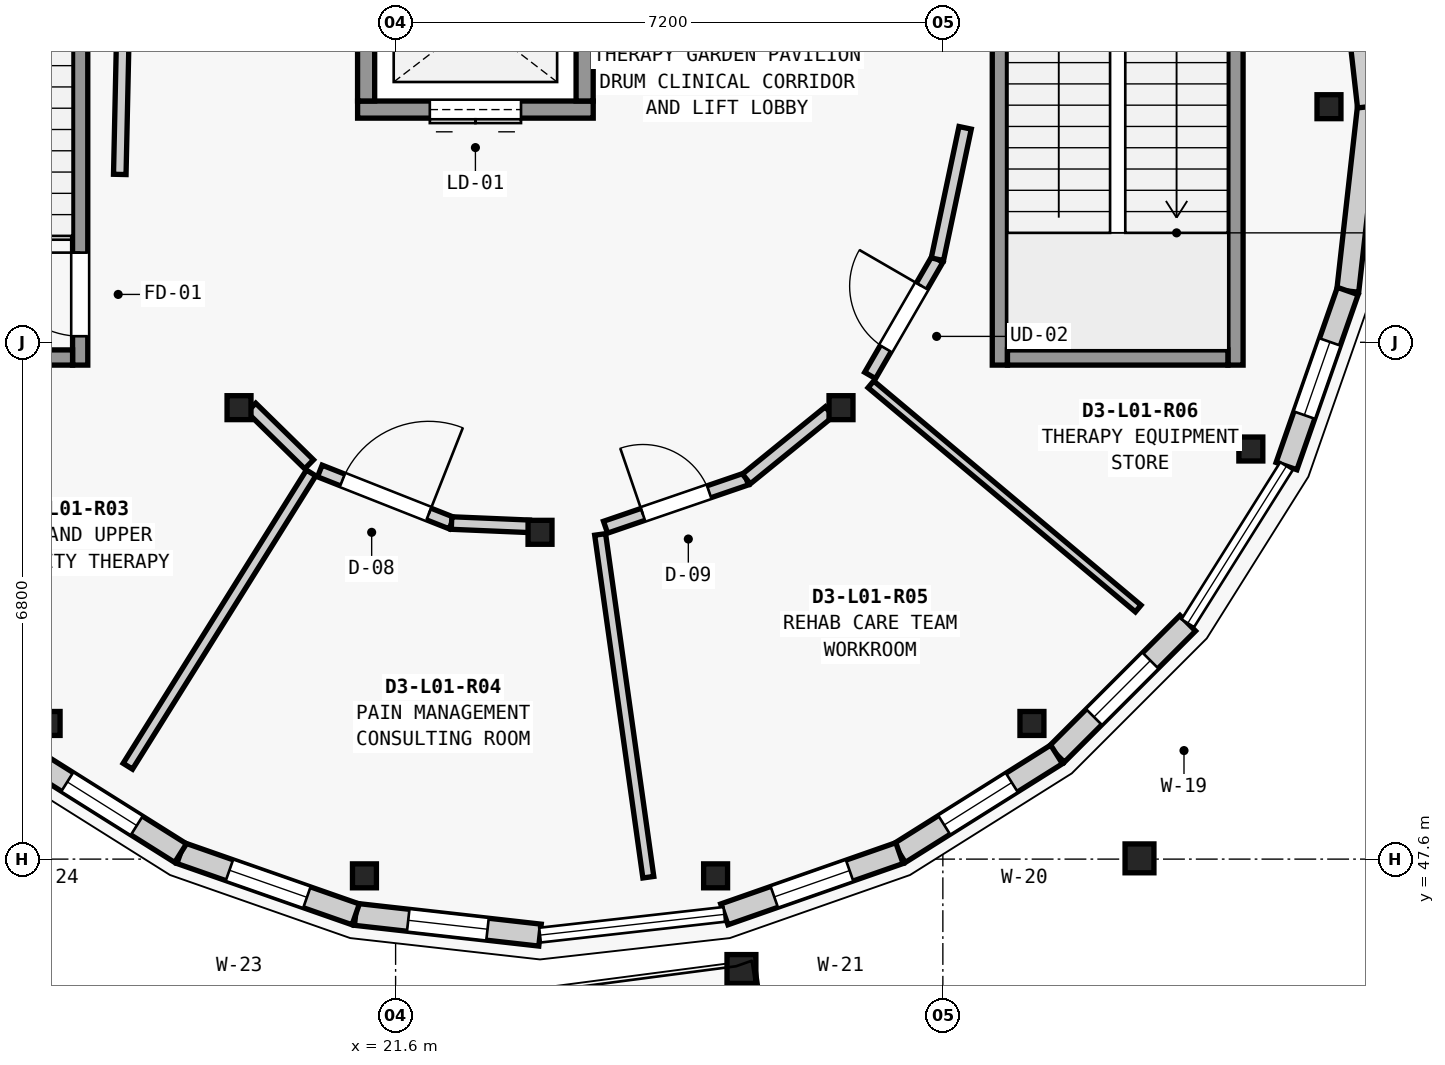
"""IFC4 building model, lengths in metres.
Left out: names, types, materials, properties, quantities, classifications, styles, units other than length and angle.
Written with IfcOpenShell. Run it as: python <this file> out.ifc"""

import sys

from ifc_helpers import new_model, si_unit, direction, frame, frame_2d, origin, origin_2d, place, context, subcontext, project, spatial, rectangle, circle, extrude, element, fill, save


model = new_model("IFC4")
c1 = context("Model", 3, precision=1e-05, world=origin(), true_north=direction((0.0, 1.0)))
c2 = subcontext(c1, "Body", "Model", "MODEL_VIEW")
j1 = project(units=[si_unit("LENGTHUNIT", "METRE"), si_unit("PLANEANGLEUNIT", "RADIAN")], contexts=[c1])
p1 = place(None, origin())
s1 = spatial("IfcSite", under=j1, at=p1, CompositionType="ELEMENT")
p2 = place(p1, origin())
s2 = spatial("IfcBuilding", under=s1, at=p2, CompositionType="ELEMENT")
p3 = place(p2, frame((0.0, 0.0, 4.55)))
s3 = spatial("IfcBuildingStorey", under=s2, at=p3, CompositionType="ELEMENT", Elevation=4.55)
for number, where, z_axis, x_axis in (
    (1, (33.88, 57.5, 0.0), (0.0, 0.0, 1.0), (1.0, 0.0, 0.0)),
    (2, (17.028, 49.385, 0.0), (0.0, 0.0, 1.0), (1.0, 0.0, 0.0)),
    (3, (21.19, 47.38, 0.0), (0.0, 0.0, 1.0), (1.0, 0.0, 0.0)),
    (4, (25.81, 47.38, 0.0), (0.0, 0.0, 1.0), (1.0, 0.0, 0.0)),
    (5, (29.972, 49.385, 0.0), (0.0, 0.0, 1.0), (1.0, 0.0, 0.0)),
    (6, (32.852, 52.996, 0.0), (0.0, 0.0, 1.0), (1.0, 0.0, 0.0)),
    (7, (19.54, 53.54, 0.0), (0.0, 0.0, 1.0), (1.0, 0.0, 0.0)),
    (8, (23.5, 51.9, 0.0), (0.0, 0.0, 1.0), (1.0, 0.0, 0.0)),
    (9, (27.46, 53.54, 0.0), (0.0, 0.0, 1.0), (1.0, 0.0, 0.0)),
):
    element("IfcColumn", number, at=place(p3, frame(where, z_axis=z_axis, x_axis=x_axis)), inside=s3, PredefinedType="COLUMN", context=c2, shape_type="SweptSolid", body=[
        extrude(rectangle(XDim=0.315, YDim=0.315, at=origin_2d()), origin(), (0.0, 0.0, 1.0), 4.2),
    ])
for number, where, z_axis, x_axis in (
    (10, (26.15, 46.154, 0.0), (0.0, 0.0, 1.0), (1.0, 0.0, 0.0)),
    (11, (31.387, 47.61, 0.0), (0.0, 0.0, 1.0), (1.0, 0.0, 0.0)),
):
    element("IfcColumn", number, at=place(p3, frame(where, z_axis=z_axis, x_axis=x_axis)), inside=s3, PredefinedType="PILASTER", context=c2, shape_type="SweptSolid", body=[
        extrude(circle(Radius=0.19, at=origin_2d()), origin(), (0.0, 0.0, 1.0), 4.2),
    ])
p4 = place(p3, frame((34.4, 57.5, 0.0), z_axis=(0.0, 0.0, 1.0), x_axis=(-0.111847873866, -0.993725340882, 0.0)))
e12 = element("IfcWall", 12, at=p4, inside=s3, PredefinedType="ELEMENTEDWALL", context=c2, shape_type="SweptSolid", body=[
    extrude(rectangle(XDim=2.44, YDim=0.29, at=frame_2d((1.22, 0.0))), origin(), (0.0, 0.0, 1.0), 3.314),
])
p5 = place(p3, frame((34.127, 55.075, 0.0), z_axis=(0.0, 0.0, 1.0), x_axis=(-0.330176659411, -0.943919156274, 0.0)))
e13 = element("IfcWall", 13, at=p5, inside=s3, PredefinedType="ELEMENTEDWALL", context=c2, shape_type="SweptSolid", body=[
    extrude(rectangle(XDim=2.441, YDim=0.29, at=frame_2d((1.22, 0.0))), origin(), (0.0, 0.0, 1.0), 3.314),
])
p6 = place(p5, frame((0.71, 0.0, 0.85)))
e14 = element("IfcOpeningElement", 14, at=p6, cuts=e13, PredefinedType="OPENING", context=c2, shape_type="SweptSolid", body=[
    extrude(rectangle(XDim=1.02, YDim=1.6, at=frame_2d((0.51, 0.8))), frame((0.0, 0.155, 0.0), z_axis=(0.0, -1.0, 0.0), x_axis=(1.0, 0.0, 0.0)), (0.0, 0.0, 1.0), 0.31),
])
p7 = place(p3, frame((32.022, 50.704, 0.0), z_axis=(0.0, 0.0, 1.0), x_axis=(-0.707106781187, -0.707106781187, 0.0)))
e15 = element("IfcWall", 15, at=p7, inside=s3, PredefinedType="ELEMENTEDWALL", context=c2, shape_type="SweptSolid", body=[
    extrude(rectangle(XDim=2.441, YDim=0.29, at=frame_2d((1.22, 0.0))), origin(), (0.0, 0.0, 1.0), 3.314),
])
p8 = place(p7, frame((0.695, 0.0, 0.85)))
e16 = element("IfcOpeningElement", 16, at=p8, cuts=e15, PredefinedType="OPENING", context=c2, shape_type="SweptSolid", body=[
    extrude(rectangle(XDim=1.05, YDim=1.35, at=frame_2d((0.525, 0.675))), frame((0.0, 0.155, 0.0), z_axis=(0.0, -1.0, 0.0), x_axis=(1.0, 0.0, 0.0)), (0.0, 0.0, 1.0), 0.31),
])
p9 = place(p3, frame((30.296, 48.978, 0.0), z_axis=(0.0, 0.0, 1.0), x_axis=(-0.846658434148, -0.532136726684, 0.0)))
e17 = element("IfcWall", 17, at=p9, inside=s3, PredefinedType="ELEMENTEDWALL", context=c2, shape_type="SweptSolid", body=[
    extrude(rectangle(XDim=2.441, YDim=0.29, at=frame_2d((1.221, 0.0))), origin(), (0.0, 0.0, 1.0), 3.314),
])
p10 = place(p9, frame((0.696, 0.0, 0.85)))
e18 = element("IfcOpeningElement", 18, at=p10, cuts=e17, PredefinedType="OPENING", context=c2, shape_type="SweptSolid", body=[
    extrude(rectangle(XDim=1.05, YDim=1.6, at=frame_2d((0.525, 0.8))), frame((0.0, 0.155, 0.0), z_axis=(0.0, -1.0, 0.0), x_axis=(1.0, 0.0, 0.0)), (0.0, 0.0, 1.0), 0.31),
])
p11 = place(p3, frame((28.229, 47.679, 0.0), z_axis=(0.0, 0.0, 1.0), x_axis=(-0.943919156274, -0.330176659411, 0.0)))
e19 = element("IfcWall", 19, at=p11, inside=s3, PredefinedType="ELEMENTEDWALL", context=c2, shape_type="SweptSolid", body=[
    extrude(rectangle(XDim=2.441, YDim=0.29, at=frame_2d((1.22, 0.0))), origin(), (0.0, 0.0, 1.0), 3.314),
])
p12 = place(p11, frame((0.695, 0.0, 0.85)))
e20 = element("IfcOpeningElement", 20, at=p12, cuts=e19, PredefinedType="OPENING", context=c2, shape_type="SweptSolid", body=[
    extrude(rectangle(XDim=1.05, YDim=1.9, at=frame_2d((0.525, 0.95))), frame((0.0, 0.155, 0.0), z_axis=(0.0, -1.0, 0.0), x_axis=(1.0, 0.0, 0.0)), (0.0, 0.0, 1.0), 0.31),
])
p13 = place(p3, frame((23.5, 46.6, 0.0), z_axis=(0.0, 0.0, 1.0), x_axis=(-0.993725340882, 0.111847873866, 0.0)))
e21 = element("IfcWall", 21, at=p13, inside=s3, PredefinedType="ELEMENTEDWALL", context=c2, shape_type="SweptSolid", body=[
    extrude(rectangle(XDim=2.44, YDim=0.29, at=frame_2d((1.22, 0.0))), origin(), (0.0, 0.0, 1.0), 3.314),
])
p14 = place(p13, frame((0.695, 0.0, 0.85)))
e22 = element("IfcOpeningElement", 22, at=p14, cuts=e21, PredefinedType="OPENING", context=c2, shape_type="SweptSolid", body=[
    extrude(rectangle(XDim=1.05, YDim=2.15, at=frame_2d((0.525, 1.075))), frame((0.0, 0.155, 0.0), z_axis=(0.0, -1.0, 0.0), x_axis=(1.0, 0.0, 0.0)), (0.0, 0.0, 1.0), 0.31),
])
p15 = place(p3, frame((21.075, 46.873, 0.0), z_axis=(0.0, 0.0, 1.0), x_axis=(-0.943919156274, 0.330176659411, 0.0)))
e23 = element("IfcWall", 23, at=p15, inside=s3, PredefinedType="ELEMENTEDWALL", context=c2, shape_type="SweptSolid", body=[
    extrude(rectangle(XDim=2.441, YDim=0.29, at=frame_2d((1.22, 0.0))), origin(), (0.0, 0.0, 1.0), 3.314),
])
p16 = place(p15, frame((0.68, 0.0, 0.85)))
e24 = element("IfcOpeningElement", 24, at=p16, cuts=e23, PredefinedType="OPENING", context=c2, shape_type="SweptSolid", body=[
    extrude(rectangle(XDim=1.08, YDim=1.5, at=frame_2d((0.54, 0.75))), frame((0.0, 0.155, 0.0), z_axis=(0.0, -1.0, 0.0), x_axis=(1.0, 0.0, 0.0)), (0.0, 0.0, 1.0), 0.31),
])
p17 = place(p3, frame((18.771, 47.679, 0.0), z_axis=(0.0, 0.0, 1.0), x_axis=(-0.846658434148, 0.532136726684, 0.0)))
e25 = element("IfcWall", 25, at=p17, inside=s3, PredefinedType="ELEMENTEDWALL", context=c2, shape_type="SweptSolid", body=[
    extrude(rectangle(XDim=2.441, YDim=0.29, at=frame_2d((1.221, 0.0))), origin(), (0.0, 0.0, 1.0), 3.314),
])
p18 = place(p17, frame((0.681, 0.0, 0.85)))
e26 = element("IfcOpeningElement", 26, at=p18, cuts=e25, PredefinedType="OPENING", context=c2, shape_type="SweptSolid", body=[
    extrude(rectangle(XDim=1.08, YDim=1.8, at=frame_2d((0.54, 0.9))), frame((0.0, 0.155, 0.0), z_axis=(0.0, -1.0, 0.0), x_axis=(1.0, 0.0, 0.0)), (0.0, 0.0, 1.0), 0.31),
])
p19 = place(p3, frame((34.127, 59.925, 0.0), z_axis=(0.0, 0.0, 1.0), x_axis=(0.111847873866, -0.993725340882, 0.0)))
e27 = element("IfcWall", 27, at=p19, inside=s3, PredefinedType="ELEMENTEDWALL", context=c2, shape_type="SweptSolid", body=[
    extrude(rectangle(XDim=2.44, YDim=0.29, at=frame_2d((1.22, 0.0))), origin(), (0.0, 0.0, 1.0), 3.314),
])
p20 = place(p3, frame((29.55, 60.9, 0.0), z_axis=(0.0, 0.0, 1.0), x_axis=(0.0, -1.0, 0.0)))
e28 = element("IfcWall", 28, at=p20, inside=s3, PredefinedType="SHEAR", context=c2, shape_type="SweptSolid", body=[
    extrude(rectangle(XDim=6.8, YDim=0.2, at=frame_2d((3.4, 0.0))), origin(), (0.0, 0.0, 1.0), 3.96),
])
p21 = place(p20, frame((0.38, 0.0, 0.0)))
e29 = element("IfcOpeningElement", 29, at=p21, cuts=e28, PredefinedType="OPENING", context=c2, shape_type="SweptSolid", body=[
    extrude(rectangle(XDim=1.1, YDim=2.15, at=frame_2d((0.55, 1.075))), frame((0.0, 0.11, 0.0), z_axis=(0.0, -1.0, 0.0), x_axis=(1.0, 0.0, 0.0)), (0.0, 0.0, 1.0), 0.22),
])
p22 = place(p3, frame((32.65, 60.9, 0.0), z_axis=(0.0, 0.0, 1.0), x_axis=(0.0, -1.0, 0.0)))
e30 = element("IfcWall", 30, at=p22, inside=s3, PredefinedType="SHEAR", context=c2, shape_type="SweptSolid", body=[
    extrude(rectangle(XDim=6.8, YDim=0.2, at=frame_2d((3.4, 0.0))), origin(), (0.0, 0.0, 1.0), 3.96),
])
p23 = place(p3, frame((29.65, 54.2, 0.0), z_axis=(0.0, 0.0, 1.0), x_axis=(1.0, 0.0, 0.0)))
e31 = element("IfcWall", 31, at=p23, inside=s3, PredefinedType="SHEAR", context=c2, shape_type="SweptSolid", body=[
    extrude(rectangle(XDim=2.9, YDim=0.2, at=frame_2d((1.45, 0.0))), origin(), (0.0, 0.0, 1.0), 3.96),
])
p24 = place(p3, frame((17.45, 54.1, 0.0), z_axis=(0.0, 0.0, 1.0), x_axis=(0.0, 1.0, 0.0)))
e32 = element("IfcWall", 32, at=p24, inside=s3, PredefinedType="SHEAR", context=c2, shape_type="SweptSolid", body=[
    extrude(rectangle(XDim=6.8, YDim=0.2, at=frame_2d((3.4, 0.0))), origin(), (0.0, 0.0, 1.0), 3.96),
])
p25 = place(p24, frame((0.38, 0.0, 0.0)))
e33 = element("IfcOpeningElement", 33, at=p25, cuts=e32, PredefinedType="OPENING", context=c2, shape_type="SweptSolid", body=[
    extrude(rectangle(XDim=1.1, YDim=2.15, at=frame_2d((0.55, 1.075))), frame((0.0, 0.11, 0.0), z_axis=(0.0, -1.0, 0.0), x_axis=(1.0, 0.0, 0.0)), (0.0, 0.0, 1.0), 0.22),
])
p26 = place(p3, frame((17.35, 54.2, 0.0), z_axis=(0.0, 0.0, 1.0), x_axis=(-1.0, 0.0, 0.0)))
e34 = element("IfcWall", 34, at=p26, inside=s3, PredefinedType="SHEAR", context=c2, shape_type="SweptSolid", body=[
    extrude(rectangle(XDim=2.9, YDim=0.2, at=frame_2d((1.45, 0.0))), origin(), (0.0, 0.0, 1.0), 3.96),
])
p27 = place(p3, frame((21.1, 57.462, 0.0), z_axis=(0.0, 0.0, 1.0), x_axis=(1.0, 0.0, 0.0)))
e35 = element("IfcWall", 35, at=p27, inside=s3, PredefinedType="SHEAR", context=c2, shape_type="SweptSolid", body=[
    extrude(rectangle(XDim=3.1, YDim=0.225, at=frame_2d((1.55, 0.0))), origin(), (0.0, 0.0, 1.0), 3.96),
])
p28 = place(p27, frame((0.95, 0.0, 0.0)))
e36 = element("IfcOpeningElement", 36, at=p28, cuts=e35, PredefinedType="OPENING", context=c2, shape_type="SweptSolid", body=[
    extrude(rectangle(XDim=1.2, YDim=2.2, at=frame_2d((0.6, 1.1))), frame((0.0, 0.123, 0.0), z_axis=(0.0, -1.0, 0.0), x_axis=(1.0, 0.0, 0.0)), (0.0, 0.0, 1.0), 0.245),
])
for number, where, z_axis, x_axis in (
    (37, (21.212, 57.575, 0.0), (0.0, 0.0, 1.0), (0.0, 1.0, 0.0)),
    (38, (24.087, 57.575, 0.0), (0.0, 0.0, 1.0), (0.0, 1.0, 0.0)),
):
    element("IfcWall", number, at=place(p3, frame(where, z_axis=z_axis, x_axis=x_axis)), inside=s3, PredefinedType="SHEAR", context=c2, shape_type="SweptSolid", body=[
        extrude(rectangle(XDim=2.15, YDim=0.225, at=frame_2d((1.075, 0.0))), origin(), (0.0, 0.0, 1.0), 3.96),
    ])
p29 = place(p3, frame((20.488, 52.681, 0.0), z_axis=(0.0, 0.0, 1.0), x_axis=(-0.529892832375, -0.848064612042, 0.0)))
e39 = element("IfcWall", 39, at=p29, inside=s3, PredefinedType="PARTITIONING", context=c2, shape_type="SweptSolid", body=[
    extrude(rectangle(XDim=4.55, YDim=0.145, at=frame_2d((2.275, 0.0))), origin(), (0.0, 0.0, 1.0), 3.279),
])
p30 = place(p3, frame((24.291, 51.872, 0.0), z_axis=(0.0, 0.0, 1.0), x_axis=(0.139214585132, -0.990262237635, 0.0)))
e40 = element("IfcWall", 40, at=p30, inside=s3, PredefinedType="PARTITIONING", context=c2, shape_type="SweptSolid", body=[
    extrude(rectangle(XDim=4.554, YDim=0.145, at=frame_2d((2.277, 0.0))), origin(), (0.0, 0.0, 1.0), 3.279),
])
p31 = place(p3, frame((27.853, 53.847, 0.0), z_axis=(0.0, 0.0, 1.0), x_axis=(0.766177182771, -0.64262938355, 0.0)))
e41 = element("IfcWall", 41, at=p31, inside=s3, PredefinedType="PARTITIONING", context=c2, shape_type="SweptSolid", body=[
    extrude(rectangle(XDim=4.59, YDim=0.115, at=frame_2d((2.295, 0.0))), origin(), (0.0, 0.0, 1.0), 3.279),
])
p32 = place(p3, frame((18.015, 58.628, 0.0), z_axis=(0.0, 0.0, 1.0), x_axis=(-0.021760263499, -0.999763217433, 0.0)))
e42 = element("IfcWall", 42, at=p32, inside=s3, PredefinedType="PARTITIONING", context=c2, shape_type="SweptSolid", body=[
    extrude(rectangle(XDim=2.02, YDim=0.165, at=frame_2d((1.01, 0.0))), origin(), (0.0, 0.0, 1.0), 3.279),
])
p33 = place(p3, frame((19.702, 53.54, 0.0), z_axis=(0.0, 0.0, 1.0), x_axis=(0.714068342312, -0.700075997666, 0.0)))
e43 = element("IfcWall", 43, at=p33, inside=s3, PredefinedType="PARTITIONING", context=c2, shape_type="SweptSolid", body=[
    extrude(rectangle(XDim=1.064, YDim=0.165, at=frame_2d((0.532, 0.0))), origin(), (0.0, 0.0, 1.0), 3.279),
])
p34 = place(p3, frame((20.603, 52.707, 0.0), z_axis=(0.0, 0.0, 1.0), x_axis=(0.929969054131, -0.367637808663, 0.0)))
e44 = element("IfcWall", 44, at=p34, inside=s3, PredefinedType="PARTITIONING", context=c2, shape_type="SweptSolid", body=[
    extrude(rectangle(XDim=1.864, YDim=0.165, at=frame_2d((0.932, 0.0))), origin(), (0.0, 0.0, 1.0), 3.279),
])
p35 = place(p34, frame((0.321, 0.0, 0.0)))
e45 = element("IfcOpeningElement", 45, at=p35, cuts=e44, PredefinedType="OPENING", context=c2, shape_type="SweptSolid", body=[
    extrude(rectangle(XDim=1.22, YDim=2.18, at=frame_2d((0.61, 1.09))), frame((0.0, 0.093, 0.0), z_axis=(0.0, -1.0, 0.0), x_axis=(1.0, 0.0, 0.0)), (0.0, 0.0, 1.0), 0.185),
])
p36 = place(p3, frame((22.336, 52.022, 0.0), z_axis=(0.0, 0.0, 1.0), x_axis=(0.999117282865, -0.042007797846, 0.0)))
e46 = element("IfcWall", 46, at=p36, inside=s3, PredefinedType="PARTITIONING", context=c2, shape_type="SweptSolid", body=[
    extrude(rectangle(XDim=1.023, YDim=0.165, at=frame_2d((0.511, 0.0))), origin(), (0.0, 0.0, 1.0), 3.279),
])
p37 = place(p3, frame((24.362, 51.967, 0.0), z_axis=(0.0, 0.0, 1.0), x_axis=(0.94599509797, 0.32418092883, 0.0)))
e47 = element("IfcWall", 47, at=p37, inside=s3, PredefinedType="PARTITIONING", context=c2, shape_type="SweptSolid", body=[
    extrude(rectangle(XDim=1.959, YDim=0.165, at=frame_2d((0.979, 0.0))), origin(), (0.0, 0.0, 1.0), 3.279),
])
p38 = place(p37, frame((0.52, 0.0, 0.0)))
e48 = element("IfcOpeningElement", 48, at=p38, cuts=e47, PredefinedType="OPENING", context=c2, shape_type="SweptSolid", body=[
    extrude(rectangle(XDim=0.92, YDim=2.24, at=frame_2d((0.46, 1.12))), frame((0.0, 0.093, 0.0), z_axis=(0.0, -1.0, 0.0), x_axis=(1.0, 0.0, 0.0)), (0.0, 0.0, 1.0), 0.185),
])
p39 = place(p3, frame((26.215, 52.602, 0.0), z_axis=(0.0, 0.0, 1.0), x_axis=(0.77622027024, 0.630461808572, 0.0)))
e49 = element("IfcWall", 49, at=p39, inside=s3, PredefinedType="PARTITIONING", context=c2, shape_type="SweptSolid", body=[
    extrude(rectangle(XDim=1.405, YDim=0.165, at=frame_2d((0.703, 0.0))), origin(), (0.0, 0.0, 1.0), 3.279),
])
p40 = place(p3, frame((27.843, 53.964, 0.0), z_axis=(0.0, 0.0, 1.0), x_axis=(0.500998134269, 0.865448363254, 0.0)))
e50 = element("IfcWall", 50, at=p40, inside=s3, PredefinedType="PARTITIONING", context=c2, shape_type="SweptSolid", body=[
    extrude(rectangle(XDim=1.767, YDim=0.165, at=frame_2d((0.883, 0.0))), origin(), (0.0, 0.0, 1.0), 3.279),
])
p41 = place(p40, frame((0.408, 0.0, 0.0)))
e51 = element("IfcOpeningElement", 51, at=p41, cuts=e50, PredefinedType="OPENING", context=c2, shape_type="SweptSolid", body=[
    extrude(rectangle(XDim=0.95, YDim=2.16, at=frame_2d((0.475, 1.08))), frame((0.0, 0.093, 0.0), z_axis=(0.0, -1.0, 0.0), x_axis=(1.0, 0.0, 0.0)), (0.0, 0.0, 1.0), 0.185),
])
p42 = place(p3, frame((28.728, 55.493, 0.0), z_axis=(0.0, 0.0, 1.0), x_axis=(0.206546592113, 0.978436766116, 0.0)))
e52 = element("IfcWall", 52, at=p42, inside=s3, PredefinedType="PARTITIONING", context=c2, shape_type="SweptSolid", body=[
    extrude(rectangle(XDim=1.767, YDim=0.165, at=frame_2d((0.884, 0.0))), origin(), (0.0, 0.0, 1.0), 3.279),
])
p43 = place(p6, origin())
e53 = element("IfcWindow", 53, at=p43, inside=s3, PartitioningType="SINGLE_PANEL", PredefinedType="WINDOW", context=c2, shape_type="SweptSolid", body=[
    extrude(rectangle(XDim=1.02, YDim=1.6, at=frame_2d((0.51, 0.8))), frame((0.0, 0.03, 0.0), z_axis=(0.0, -1.0, 0.0), x_axis=(1.0, 0.0, 0.0)), (0.0, 0.0, 1.0), 0.06),
])
fill(e14, e53)
p44 = place(p8, origin())
e54 = element("IfcWindow", 54, at=p44, inside=s3, PartitioningType="SINGLE_PANEL", PredefinedType="WINDOW", context=c2, shape_type="SweptSolid", body=[
    extrude(rectangle(XDim=1.05, YDim=1.35, at=frame_2d((0.525, 0.675))), frame((0.0, 0.03, 0.0), z_axis=(0.0, -1.0, 0.0), x_axis=(1.0, 0.0, 0.0)), (0.0, 0.0, 1.0), 0.06),
])
fill(e16, e54)
p45 = place(p10, origin())
e55 = element("IfcWindow", 55, at=p45, inside=s3, PartitioningType="SINGLE_PANEL", PredefinedType="WINDOW", context=c2, shape_type="SweptSolid", body=[
    extrude(rectangle(XDim=1.05, YDim=1.6, at=frame_2d((0.525, 0.8))), frame((0.0, 0.03, 0.0), z_axis=(0.0, -1.0, 0.0), x_axis=(1.0, 0.0, 0.0)), (0.0, 0.0, 1.0), 0.06),
])
fill(e18, e55)
p46 = place(p12, origin())
e56 = element("IfcWindow", 56, at=p46, inside=s3, PartitioningType="SINGLE_PANEL", PredefinedType="WINDOW", context=c2, shape_type="SweptSolid", body=[
    extrude(rectangle(XDim=1.05, YDim=1.9, at=frame_2d((0.525, 0.95))), frame((0.0, 0.03, 0.0), z_axis=(0.0, -1.0, 0.0), x_axis=(1.0, 0.0, 0.0)), (0.0, 0.0, 1.0), 0.06),
])
fill(e20, e56)
p47 = place(p14, origin())
e57 = element("IfcWindow", 57, at=p47, inside=s3, PartitioningType="SINGLE_PANEL", PredefinedType="WINDOW", context=c2, shape_type="SweptSolid", body=[
    extrude(rectangle(XDim=1.05, YDim=2.15, at=frame_2d((0.525, 1.075))), frame((0.0, 0.03, 0.0), z_axis=(0.0, -1.0, 0.0), x_axis=(1.0, 0.0, 0.0)), (0.0, 0.0, 1.0), 0.06),
])
fill(e22, e57)
p48 = place(p16, origin())
e58 = element("IfcWindow", 58, at=p48, inside=s3, PartitioningType="SINGLE_PANEL", PredefinedType="WINDOW", context=c2, shape_type="SweptSolid", body=[
    extrude(rectangle(XDim=1.08, YDim=1.5, at=frame_2d((0.54, 0.75))), frame((0.0, 0.03, 0.0), z_axis=(0.0, -1.0, 0.0), x_axis=(1.0, 0.0, 0.0)), (0.0, 0.0, 1.0), 0.06),
])
fill(e24, e58)
p49 = place(p18, origin())
e59 = element("IfcWindow", 59, at=p49, inside=s3, PartitioningType="SINGLE_PANEL", PredefinedType="WINDOW", context=c2, shape_type="SweptSolid", body=[
    extrude(rectangle(XDim=1.08, YDim=1.8, at=frame_2d((0.54, 0.9))), frame((0.0, 0.03, 0.0), z_axis=(0.0, -1.0, 0.0), x_axis=(1.0, 0.0, 0.0)), (0.0, 0.0, 1.0), 0.06),
])
fill(e26, e59)
p50 = place(p25, origin())
e60 = element("IfcDoor", 60, at=p50, inside=s3, OperationType="SINGLE_SWING_RIGHT", PredefinedType="DOOR", context=c2, shape_type="SweptSolid", body=[
    extrude(rectangle(XDim=1.1, YDim=2.15, at=frame_2d((0.55, 1.075))), frame((0.0, 0.025, 0.0), z_axis=(0.0, -1.0, 0.0), x_axis=(1.0, 0.0, 0.0)), (0.0, 0.0, 1.0), 0.05),
])
fill(e33, e60)
p51 = place(p28, origin())
e61 = element("IfcDoor", 61, at=p51, inside=s3, OperationType="DOUBLE_DOOR_SLIDING", PredefinedType="DOOR", context=c2, shape_type="SweptSolid", body=[
    extrude(rectangle(XDim=1.2, YDim=2.2, at=frame_2d((0.6, 1.1))), frame((0.0, 0.025, 0.0), z_axis=(0.0, -1.0, 0.0), x_axis=(1.0, 0.0, 0.0)), (0.0, 0.0, 1.0), 0.05),
])
fill(e36, e61)
p52 = place(p35, origin())
e62 = element("IfcDoor", 62, at=p52, inside=s3, OperationType="SINGLE_SWING_RIGHT", PredefinedType="DOOR", context=c2, shape_type="SweptSolid", body=[
    extrude(rectangle(XDim=1.22, YDim=2.18, at=frame_2d((0.61, 1.09))), frame((0.0, 0.025, 0.0), z_axis=(0.0, -1.0, 0.0), x_axis=(1.0, 0.0, 0.0)), (0.0, 0.0, 1.0), 0.05),
])
fill(e45, e62)
p53 = place(p38, origin())
e63 = element("IfcDoor", 63, at=p53, inside=s3, OperationType="SINGLE_SWING_LEFT", PredefinedType="DOOR", context=c2, shape_type="SweptSolid", body=[
    extrude(rectangle(XDim=0.92, YDim=2.24, at=frame_2d((0.46, 1.12))), frame((0.0, 0.025, 0.0), z_axis=(0.0, -1.0, 0.0), x_axis=(1.0, 0.0, 0.0)), (0.0, 0.0, 1.0), 0.05),
])
fill(e48, e63)
p54 = place(p41, origin())
e64 = element("IfcDoor", 64, at=p54, inside=s3, OperationType="SINGLE_SWING_RIGHT", PredefinedType="DOOR", context=c2, shape_type="SweptSolid", body=[
    extrude(rectangle(XDim=0.95, YDim=2.16, at=frame_2d((0.475, 1.08))), frame((0.0, 0.025, 0.0), z_axis=(0.0, -1.0, 0.0), x_axis=(1.0, 0.0, 0.0)), (0.0, 0.0, 1.0), 0.05),
])
fill(e51, e64)
save(model, sys.argv[1])
